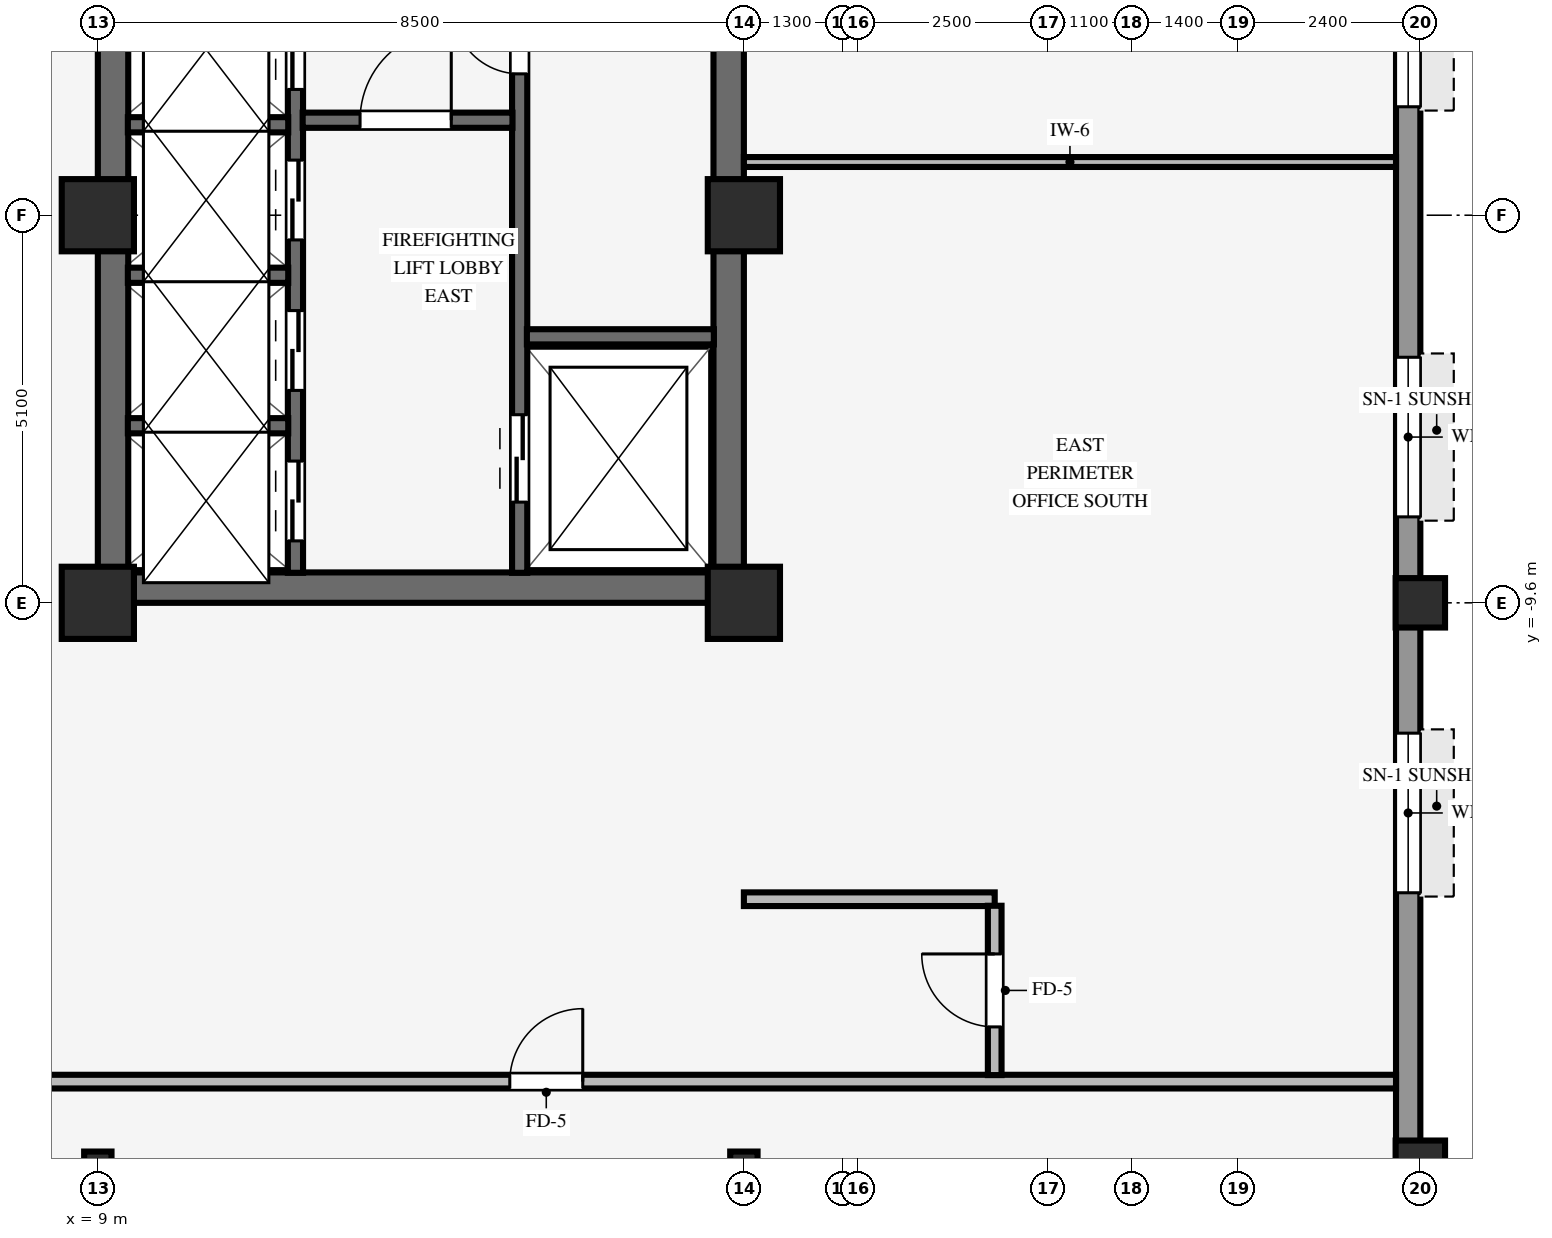
"""IFC4 building model, lengths in metres.
Left out: names, types, materials, properties, quantities, classifications, styles, units other than length and angle.
Written with IfcOpenShell. Run it as: python <this file> out.ifc"""

import sys

from ifc_helpers import new_model, si_unit, direction, frame, frame_2d, origin, origin_2d, place, context, subcontext, project, spatial, rectangle, hollow_rectangle, i_section, extrude, source, transform, mapped, element, fill, save


model = new_model("IFC4")
c1 = context("Model", 3, precision=1e-05, world=origin(), true_north=direction((0.0, 1.0)))
c2 = subcontext(c1, "Body", "Model", "MODEL_VIEW")
j1 = project(units=[si_unit("LENGTHUNIT", "METRE"), si_unit("PLANEANGLEUNIT", "RADIAN")], contexts=[c1])
p1 = place(None, origin())
s1 = spatial("IfcSite", under=j1, at=p1, CompositionType="ELEMENT")
p2 = place(p1, origin())
s2 = spatial("IfcBuilding", under=s1, at=p2, CompositionType="ELEMENT")
p3 = place(p2, frame((0.0, 0.0, 134.8)))
s3 = spatial("IfcBuildingStorey", under=s2, at=p3, CompositionType="ELEMENT", Elevation=134.8)
p4 = place(p3, frame((9.0, -9.4, 0.0), z_axis=(0.0, 0.0, 1.0), x_axis=(1.0, 0.0, 0.0)))
e1 = element("IfcWall", 1, at=p4, inside=s3, PredefinedType="SHEAR", context=c2, shape_type="SweptSolid", body=[
    extrude(rectangle(XDim=8.5, YDim=0.4, at=frame_2d((4.25, 0.0))), origin(), (0.0, 0.0, 1.0), 3.37),
])
p5 = place(p3, frame((9.2, -9.205, 0.0), z_axis=(0.0, 0.0, 1.0), x_axis=(0.0, 1.0, 0.0)))
e2 = element("IfcWall", 2, at=p5, inside=s3, PredefinedType="SHEAR", context=c2, shape_type="SweptSolid", body=[
    extrude(rectangle(XDim=18.41, YDim=0.4, at=frame_2d((9.205, 0.0))), origin(), (0.0, 0.0, 1.0), 3.37),
])
p6 = place(p5, frame((8.605, 0.0, 0.0)))
e3 = element("IfcOpeningElement", 3, at=p6, cuts=e2, PredefinedType="OPENING", context=c2, shape_type="SweptSolid", body=[
    extrude(rectangle(XDim=1.2, YDim=2.15, at=frame_2d((0.6, 1.075))), frame((0.0, 0.21, 0.0), z_axis=(0.0, -1.0, 0.0), x_axis=(1.0, 0.0, 0.0)), (0.0, 0.0, 1.0), 0.42),
])
p7 = place(p3, frame((17.3, -9.205, 0.0), z_axis=(0.0, 0.0, 1.0), x_axis=(0.0, 1.0, 0.0)))
e4 = element("IfcWall", 4, at=p7, inside=s3, PredefinedType="SHEAR", context=c2, shape_type="SweptSolid", body=[
    extrude(rectangle(XDim=18.41, YDim=0.4, at=frame_2d((9.205, 0.0))), origin(), (0.0, 0.0, 1.0), 3.37),
])
for number, where, z_axis, x_axis in (
    (5, (9.0, -9.6, 0.0), (0.0, 0.0, 1.0), (1.0, 0.0, 0.0)),
    (6, (9.0, -4.5, 0.0), (0.0, 0.0, 1.0), (1.0, 0.0, 0.0)),
    (7, (17.5, -9.6, 0.0), (0.0, 0.0, 1.0), (1.0, 0.0, 0.0)),
    (8, (17.5, -4.5, 0.0), (0.0, 0.0, 1.0), (1.0, 0.0, 0.0)),
):
    element("IfcColumn", number, at=place(p3, frame(where, z_axis=z_axis, x_axis=x_axis)), inside=s3, PredefinedType="COLUMN", context=c2, shape_type="SweptSolid", body=[
        extrude(rectangle(XDim=0.95, YDim=0.95, at=origin_2d()), origin(), (0.0, 0.0, 1.0), 3.37),
    ])
for number, where, z_axis, x_axis in (
    (9, (26.4, -17.0, 0.0), (0.0, 0.0, 1.0), (1.0, 0.0, 0.0)),
    (10, (26.4, -9.6, 0.0), (0.0, 0.0, 1.0), (1.0, 0.0, 0.0)),
):
    element("IfcColumn", number, at=place(p3, frame(where, z_axis=z_axis, x_axis=x_axis)), inside=s3, PredefinedType="COLUMN", context=c2, shape_type="SweptSolid", body=[
        extrude(hollow_rectangle(XDim=0.65, YDim=0.65, WallThickness=0.04, InnerFilletRadius=0.04, OuterFilletRadius=0.08, at=origin_2d()), origin(), (0.0, 0.0, 1.0), 3.37),
    ])
for number, where, z_axis, x_axis in (
    (11, (9.0, -17.0, 0.0), (0.0, 0.0, 1.0), (1.0, 0.0, 0.0)),
    (12, (17.5, -17.0, 0.0), (0.0, 0.0, 1.0), (1.0, 0.0, 0.0)),
):
    element("IfcColumn", number, at=place(p3, frame(where, z_axis=z_axis, x_axis=x_axis)), inside=s3, PredefinedType="COLUMN", context=c2, shape_type="SweptSolid", body=[
        extrude(i_section(OverallWidth=0.36, OverallDepth=0.36, WebThickness=0.021, FlangeThickness=0.021, FilletRadius=0.018, at=origin_2d()), origin(), (0.0, 0.0, 1.0), 3.37),
    ])
p8 = place(p3, frame((26.24, -20.784, 0.0), z_axis=(0.0, 0.0, 1.0), x_axis=(0.0, 1.0, 0.0)))
e13 = element("IfcWall", 13, at=p8, inside=s3, PredefinedType="STANDARD", context=c2, shape_type="SweptSolid", body=[
    extrude(rectangle(XDim=41.568, YDim=0.32, at=frame_2d((20.784, 0.0))), origin(), (0.0, 0.0, 1.0), 2.705),
])
p9 = place(p8, frame((7.369, 0.0, 0.8)))
e14 = element("IfcOpeningElement", 14, at=p9, cuts=e13, PredefinedType="OPENING", context=c2, shape_type="SweptSolid", body=[
    extrude(rectangle(XDim=2.1, YDim=1.56, at=frame_2d((1.05, 0.78))), frame((0.0, 0.17, 0.0), z_axis=(0.0, -1.0, 0.0), x_axis=(1.0, 0.0, 0.0)), (0.0, 0.0, 1.0), 0.34),
])
p10 = place(p8, frame((12.315, 0.0, 0.8)))
e15 = element("IfcOpeningElement", 15, at=p10, cuts=e13, PredefinedType="OPENING", context=c2, shape_type="SweptSolid", body=[
    extrude(rectangle(XDim=2.1, YDim=1.56, at=frame_2d((1.05, 0.78))), frame((0.0, 0.17, 0.0), z_axis=(0.0, -1.0, 0.0), x_axis=(1.0, 0.0, 0.0)), (0.0, 0.0, 1.0), 0.34),
])
p11 = place(p8, frame((17.711, 0.0, 0.8)))
e16 = element("IfcOpeningElement", 16, at=p11, cuts=e13, PredefinedType="OPENING", context=c2, shape_type="SweptSolid", body=[
    extrude(rectangle(XDim=2.1, YDim=1.56, at=frame_2d((1.05, 0.78))), frame((0.0, 0.17, 0.0), z_axis=(0.0, -1.0, 0.0), x_axis=(1.0, 0.0, 0.0)), (0.0, 0.0, 1.0), 0.34),
])
p12 = place(p8, frame((22.207, 0.0, 0.8)))
e17 = element("IfcOpeningElement", 17, at=p12, cuts=e13, PredefinedType="OPENING", context=c2, shape_type="SweptSolid", body=[
    extrude(rectangle(XDim=2.1, YDim=1.56, at=frame_2d((1.05, 0.78))), frame((0.0, 0.17, 0.0), z_axis=(0.0, -1.0, 0.0), x_axis=(1.0, 0.0, 0.0)), (0.0, 0.0, 1.0), 0.34),
])
p13 = place(p8, frame((27.153, 0.0, 0.8)))
e18 = element("IfcOpeningElement", 18, at=p13, cuts=e13, PredefinedType="OPENING", context=c2, shape_type="SweptSolid", body=[
    extrude(rectangle(XDim=2.1, YDim=1.56, at=frame_2d((1.05, 0.78))), frame((0.0, 0.17, 0.0), z_axis=(0.0, -1.0, 0.0), x_axis=(1.0, 0.0, 0.0)), (0.0, 0.0, 1.0), 0.34),
])
p14 = place(p8, frame((32.099, 0.0, 0.8)))
e19 = element("IfcOpeningElement", 19, at=p14, cuts=e13, PredefinedType="OPENING", context=c2, shape_type="SweptSolid", body=[
    extrude(rectangle(XDim=2.1, YDim=1.56, at=frame_2d((1.05, 0.78))), frame((0.0, 0.17, 0.0), z_axis=(0.0, -1.0, 0.0), x_axis=(1.0, 0.0, 0.0)), (0.0, 0.0, 1.0), 0.34),
])
p15 = place(p3, frame((14.55, -9.205, 0.0), z_axis=(0.0, 0.0, 1.0), x_axis=(0.0, 1.0, 0.0)))
e20 = element("IfcWall", 20, at=p15, inside=s3, PredefinedType="SHEAR", context=c2, shape_type="SweptSolid", body=[
    extrude(rectangle(XDim=10.11, YDim=0.2, at=frame_2d((5.055, 0.0))), origin(), (0.0, 0.0, 1.0), 3.37),
])
p16 = place(p15, frame((6.565, 0.0, 0.0)))
e21 = element("IfcOpeningElement", 21, at=p16, cuts=e20, PredefinedType="OPENING", context=c2, shape_type="SweptSolid", body=[
    extrude(rectangle(XDim=0.88, YDim=2.1, at=frame_2d((0.44, 1.05))), frame((0.0, 0.11, 0.0), z_axis=(0.0, -1.0, 0.0), x_axis=(1.0, 0.0, 0.0)), (0.0, 0.0, 1.0), 0.22),
])
p17 = place(p15, frame((0.93, 0.0, 0.0)))
e22 = element("IfcOpeningElement", 22, at=p17, cuts=e20, PredefinedType="OPENING", context=c2, shape_type="SweptSolid", body=[
    extrude(rectangle(XDim=1.15, YDim=2.15, at=frame_2d((0.575, 1.075))), frame((0.0, 0.11, 0.0), z_axis=(0.0, -1.0, 0.0), x_axis=(1.0, 0.0, 0.0)), (0.0, 0.0, 1.0), 0.22),
])
p18 = place(p3, frame((14.645, -6.1, 0.0), z_axis=(0.0, 0.0, 1.0), x_axis=(1.0, 0.0, 0.0)))
e23 = element("IfcWall", 23, at=p18, inside=s3, PredefinedType="SHEAR", context=c2, shape_type="SweptSolid", body=[
    extrude(rectangle(XDim=2.46, YDim=0.2, at=frame_2d((1.23, 0.0))), origin(), (0.0, 0.0, 1.0), 3.37),
])
p19 = place(p3, frame((11.6, -9.205, 0.0), z_axis=(0.0, 0.0, 1.0), x_axis=(0.0, 1.0, 0.0)))
e24 = element("IfcWall", 24, at=p19, inside=s3, PredefinedType="SHEAR", context=c2, shape_type="SweptSolid", body=[
    extrude(rectangle(XDim=7.975, YDim=0.2, at=frame_2d((3.988, 0.0))), origin(), (0.0, 0.0, 1.0), 3.37),
])
p20 = place(p19, frame((0.42, 0.0, 0.0)))
e25 = element("IfcOpeningElement", 25, at=p20, cuts=e24, PredefinedType="OPENING", context=c2, shape_type="SweptSolid", body=[
    extrude(rectangle(XDim=1.05, YDim=2.15, at=frame_2d((0.525, 1.075))), frame((0.0, 0.11, 0.0), z_axis=(0.0, -1.0, 0.0), x_axis=(1.0, 0.0, 0.0)), (0.0, 0.0, 1.0), 0.22),
])
p21 = place(p19, frame((2.4, 0.0, 0.0)))
e26 = element("IfcOpeningElement", 26, at=p21, cuts=e24, PredefinedType="OPENING", context=c2, shape_type="SweptSolid", body=[
    extrude(rectangle(XDim=1.05, YDim=2.15, at=frame_2d((0.525, 1.075))), frame((0.0, 0.11, 0.0), z_axis=(0.0, -1.0, 0.0), x_axis=(1.0, 0.0, 0.0)), (0.0, 0.0, 1.0), 0.22),
])
p22 = place(p19, frame((4.38, 0.0, 0.0)))
e27 = element("IfcOpeningElement", 27, at=p22, cuts=e24, PredefinedType="OPENING", context=c2, shape_type="SweptSolid", body=[
    extrude(rectangle(XDim=1.05, YDim=2.15, at=frame_2d((0.525, 1.075))), frame((0.0, 0.11, 0.0), z_axis=(0.0, -1.0, 0.0), x_axis=(1.0, 0.0, 0.0)), (0.0, 0.0, 1.0), 0.22),
])
p23 = place(p19, frame((6.36, 0.0, 0.0)))
e28 = element("IfcOpeningElement", 28, at=p23, cuts=e24, PredefinedType="OPENING", context=c2, shape_type="SweptSolid", body=[
    extrude(rectangle(XDim=1.05, YDim=2.15, at=frame_2d((0.525, 1.075))), frame((0.0, 0.11, 0.0), z_axis=(0.0, -1.0, 0.0), x_axis=(1.0, 0.0, 0.0)), (0.0, 0.0, 1.0), 0.22),
])
p24 = place(p3, frame((11.695, -3.25, 0.0), z_axis=(0.0, 0.0, 1.0), x_axis=(1.0, 0.0, 0.0)))
e29 = element("IfcWall", 29, at=p24, inside=s3, PredefinedType="SHEAR", context=c2, shape_type="SweptSolid", body=[
    extrude(rectangle(XDim=2.76, YDim=0.2, at=frame_2d((1.38, 0.0))), origin(), (0.0, 0.0, 1.0), 3.37),
])
p25 = place(p24, frame((0.755, 0.0, 0.0)))
e30 = element("IfcOpeningElement", 30, at=p25, cuts=e29, PredefinedType="OPENING", context=c2, shape_type="SweptSolid", body=[
    extrude(rectangle(XDim=1.2, YDim=2.15, at=frame_2d((0.6, 1.075))), frame((0.0, 0.11, 0.0), z_axis=(0.0, -1.0, 0.0), x_axis=(1.0, 0.0, 0.0)), (0.0, 0.0, 1.0), 0.22),
])
for number, where, z_axis, x_axis in (
    (31, (9.395, -7.27, 0.0), (0.0, 0.0, 1.0), (1.0, 0.0, 0.0)),
    (32, (9.395, -5.29, 0.0), (0.0, 0.0, 1.0), (1.0, 0.0, 0.0)),
    (33, (9.395, -3.31, 0.0), (0.0, 0.0, 1.0), (1.0, 0.0, 0.0)),
):
    element("IfcWall", number, at=place(p3, frame(where, z_axis=z_axis, x_axis=x_axis)), inside=s3, PredefinedType="SHEAR", context=c2, shape_type="SweptSolid", body=[
        extrude(rectangle(XDim=2.11, YDim=0.2, at=frame_2d((1.055, 0.0))), origin(), (0.0, 0.0, 1.0), 3.37),
    ])
p26 = place(p3, frame((-26.08, -15.9, 0.0), z_axis=(0.0, 0.0, 1.0), x_axis=(1.0, 0.0, 0.0)))
e34 = element("IfcWall", 34, at=p26, inside=s3, PredefinedType="PARTITIONING", context=c2, shape_type="SweptSolid", body=[
    extrude(rectangle(XDim=52.16, YDim=0.18, at=frame_2d((26.08, 0.0))), origin(), (0.0, 0.0, 1.0), 3.36),
])
p27 = place(p26, frame((14.28, 0.0, 0.0)))
e35 = element("IfcOpeningElement", 35, at=p27, cuts=e34, PredefinedType="OPENING", context=c2, shape_type="SweptSolid", body=[
    extrude(rectangle(XDim=0.96, YDim=2.1, at=frame_2d((0.48, 1.05))), frame((0.0, 0.1, 0.0), z_axis=(0.0, -1.0, 0.0), x_axis=(1.0, 0.0, 0.0)), (0.0, 0.0, 1.0), 0.2),
])
p28 = place(p26, frame((40.5, 0.0, 0.0)))
e36 = element("IfcOpeningElement", 36, at=p28, cuts=e34, PredefinedType="OPENING", context=c2, shape_type="SweptSolid", body=[
    extrude(rectangle(XDim=0.96, YDim=2.1, at=frame_2d((0.48, 1.05))), frame((0.0, 0.1, 0.0), z_axis=(0.0, -1.0, 0.0), x_axis=(1.0, 0.0, 0.0)), (0.0, 0.0, 1.0), 0.2),
])
p29 = place(p3, frame((17.5, -13.5, 0.0), z_axis=(0.0, 0.0, 1.0), x_axis=(1.0, 0.0, 0.0)))
e37 = element("IfcWall", 37, at=p29, inside=s3, PredefinedType="PARTITIONING", context=c2, shape_type="SweptSolid", body=[
    extrude(rectangle(XDim=3.3, YDim=0.18, at=frame_2d((1.65, 0.0))), origin(), (0.0, 0.0, 1.0), 2.998),
])
p30 = place(p3, frame((17.5, -3.8, 0.0), z_axis=(0.0, 0.0, 1.0), x_axis=(1.0, 0.0, 0.0)))
e38 = element("IfcWall", 38, at=p30, inside=s3, PredefinedType="PARTITIONING", context=c2, shape_type="SweptSolid", body=[
    extrude(rectangle(XDim=8.58, YDim=0.13, at=frame_2d((4.29, 0.0))), origin(), (0.0, 0.0, 1.0), 3.36),
])
p31 = place(p3, frame((20.8, -15.814, 0.0), z_axis=(0.0, 0.0, 1.0), x_axis=(0.0, 1.0, 0.0)))
e39 = element("IfcWall", 39, at=p31, inside=s3, PredefinedType="PARTITIONING", context=c2, shape_type="SweptSolid", body=[
    extrude(rectangle(XDim=2.228, YDim=0.18, at=frame_2d((1.114, 0.0))), origin(), (0.0, 0.0, 1.0), 3.36),
])
p32 = place(p31, frame((0.634, 0.0, 0.0)))
e40 = element("IfcOpeningElement", 40, at=p32, cuts=e39, PredefinedType="OPENING", context=c2, shape_type="SweptSolid", body=[
    extrude(rectangle(XDim=0.96, YDim=2.1, at=frame_2d((0.48, 1.05))), frame((0.0, 0.1, 0.0), z_axis=(0.0, -1.0, 0.0), x_axis=(1.0, 0.0, 0.0)), (0.0, 0.0, 1.0), 0.2),
])
m1 = source(origin(), c2, "Body", "SweptSolid", [
    extrude(rectangle(XDim=2.1, YDim=1.56, at=frame_2d((1.05, 0.78))), frame((0.0, 0.03, 0.0), z_axis=(0.0, -1.0, 0.0), x_axis=(1.0, 0.0, 0.0)), (0.0, 0.0, 1.0), 0.06),
])
p33 = place(p9, origin())
e41 = element("IfcWindow", 41, at=p33, inside=s3, PartitioningType="SINGLE_PANEL", PredefinedType="WINDOW", context=c2, shape_type="MappedRepresentation", body=[
    mapped(m1, transform((0.0, 0.0, 0.0), scale=1.0)),
])
fill(e14, e41)
p34 = place(p10, origin())
e42 = element("IfcWindow", 42, at=p34, inside=s3, PartitioningType="SINGLE_PANEL", PredefinedType="WINDOW", context=c2, shape_type="MappedRepresentation", body=[
    mapped(m1, transform((0.0, 0.0, 0.0), scale=1.0)),
])
fill(e15, e42)
p35 = place(p11, origin())
e43 = element("IfcWindow", 43, at=p35, inside=s3, PartitioningType="SINGLE_PANEL", PredefinedType="WINDOW", context=c2, shape_type="MappedRepresentation", body=[
    mapped(m1, transform((0.0, 0.0, 0.0), scale=1.0)),
])
fill(e16, e43)
m2 = source(origin(), c2, "Body", "SweptSolid", [
    extrude(rectangle(XDim=0.88, YDim=2.1, at=frame_2d((0.44, 1.05))), frame((0.0, 0.025, 0.0), z_axis=(0.0, -1.0, 0.0), x_axis=(1.0, 0.0, 0.0)), (0.0, 0.0, 1.0), 0.05),
])
p36 = place(p16, origin())
e44 = element("IfcDoor", 44, at=p36, inside=s3, OperationType="SINGLE_SWING_RIGHT", PredefinedType="DOOR", context=c2, shape_type="MappedRepresentation", body=[
    mapped(m2, transform((0.0, 0.0, 0.0), scale=1.0)),
])
fill(e21, e44)
m3 = source(origin(), c2, "Body", "SweptSolid", [
    extrude(rectangle(XDim=1.2, YDim=2.15, at=frame_2d((0.6, 1.075))), frame((0.0, 0.025, 0.0), z_axis=(0.0, -1.0, 0.0), x_axis=(1.0, 0.0, 0.0)), (0.0, 0.0, 1.0), 0.05),
])
p37 = place(p25, origin())
e45 = element("IfcDoor", 45, at=p37, inside=s3, OperationType="SINGLE_SWING_RIGHT", PredefinedType="DOOR", context=c2, shape_type="MappedRepresentation", body=[
    mapped(m3, transform((0.0, 0.0, 0.0), scale=1.0)),
])
fill(e30, e45)
m4 = source(origin(), c2, "Body", "SweptSolid", [
    extrude(rectangle(XDim=1.15, YDim=2.15, at=frame_2d((0.575, 1.075))), frame((0.0, 0.025, 0.0), z_axis=(0.0, -1.0, 0.0), x_axis=(1.0, 0.0, 0.0)), (0.0, 0.0, 1.0), 0.05),
])
p38 = place(p17, origin())
e46 = element("IfcDoor", 46, at=p38, inside=s3, OperationType="DOUBLE_DOOR_SLIDING", PredefinedType="DOOR", context=c2, shape_type="MappedRepresentation", body=[
    mapped(m4, transform((0.0, 0.0, 0.0), scale=1.0)),
])
fill(e22, e46)
m5 = source(origin(), c2, "Body", "SweptSolid", [
    extrude(rectangle(XDim=1.05, YDim=2.15, at=frame_2d((0.525, 1.075))), frame((0.0, 0.025, 0.0), z_axis=(0.0, -1.0, 0.0), x_axis=(1.0, 0.0, 0.0)), (0.0, 0.0, 1.0), 0.05),
])
p39 = place(p20, origin())
e47 = element("IfcDoor", 47, at=p39, inside=s3, OperationType="DOUBLE_DOOR_SLIDING", PredefinedType="DOOR", context=c2, shape_type="MappedRepresentation", body=[
    mapped(m5, transform((0.0, 0.0, 0.0), scale=1.0)),
])
fill(e25, e47)
p40 = place(p21, origin())
e48 = element("IfcDoor", 48, at=p40, inside=s3, OperationType="DOUBLE_DOOR_SLIDING", PredefinedType="DOOR", context=c2, shape_type="MappedRepresentation", body=[
    mapped(m5, transform((0.0, 0.0, 0.0), scale=1.0)),
])
fill(e26, e48)
p41 = place(p22, origin())
e49 = element("IfcDoor", 49, at=p41, inside=s3, OperationType="DOUBLE_DOOR_SLIDING", PredefinedType="DOOR", context=c2, shape_type="MappedRepresentation", body=[
    mapped(m5, transform((0.0, 0.0, 0.0), scale=1.0)),
])
fill(e27, e49)
p42 = place(p23, origin())
e50 = element("IfcDoor", 50, at=p42, inside=s3, OperationType="DOUBLE_DOOR_SLIDING", PredefinedType="DOOR", context=c2, shape_type="MappedRepresentation", body=[
    mapped(m5, transform((0.0, 0.0, 0.0), scale=1.0)),
])
fill(e28, e50)
m6 = source(origin(), c2, "Body", "SweptSolid", [
    extrude(rectangle(XDim=0.96, YDim=2.1, at=frame_2d((0.48, 1.05))), frame((0.0, 0.025, 0.0), z_axis=(0.0, -1.0, 0.0), x_axis=(1.0, 0.0, 0.0)), (0.0, 0.0, 1.0), 0.05),
])
p43 = place(p28, origin())
e51 = element("IfcDoor", 51, at=p43, inside=s3, OperationType="SINGLE_SWING_RIGHT", PredefinedType="DOOR", context=c2, shape_type="MappedRepresentation", body=[
    mapped(m6, transform((0.0, 0.0, 0.0), scale=1.0)),
])
fill(e36, e51)
p44 = place(p32, origin())
e52 = element("IfcDoor", 52, at=p44, inside=s3, OperationType="SINGLE_SWING_RIGHT", PredefinedType="DOOR", context=c2, shape_type="MappedRepresentation", body=[
    mapped(m6, transform((0.0, 0.0, 0.0), scale=1.0)),
])
fill(e40, e52)
save(model, sys.argv[1])
